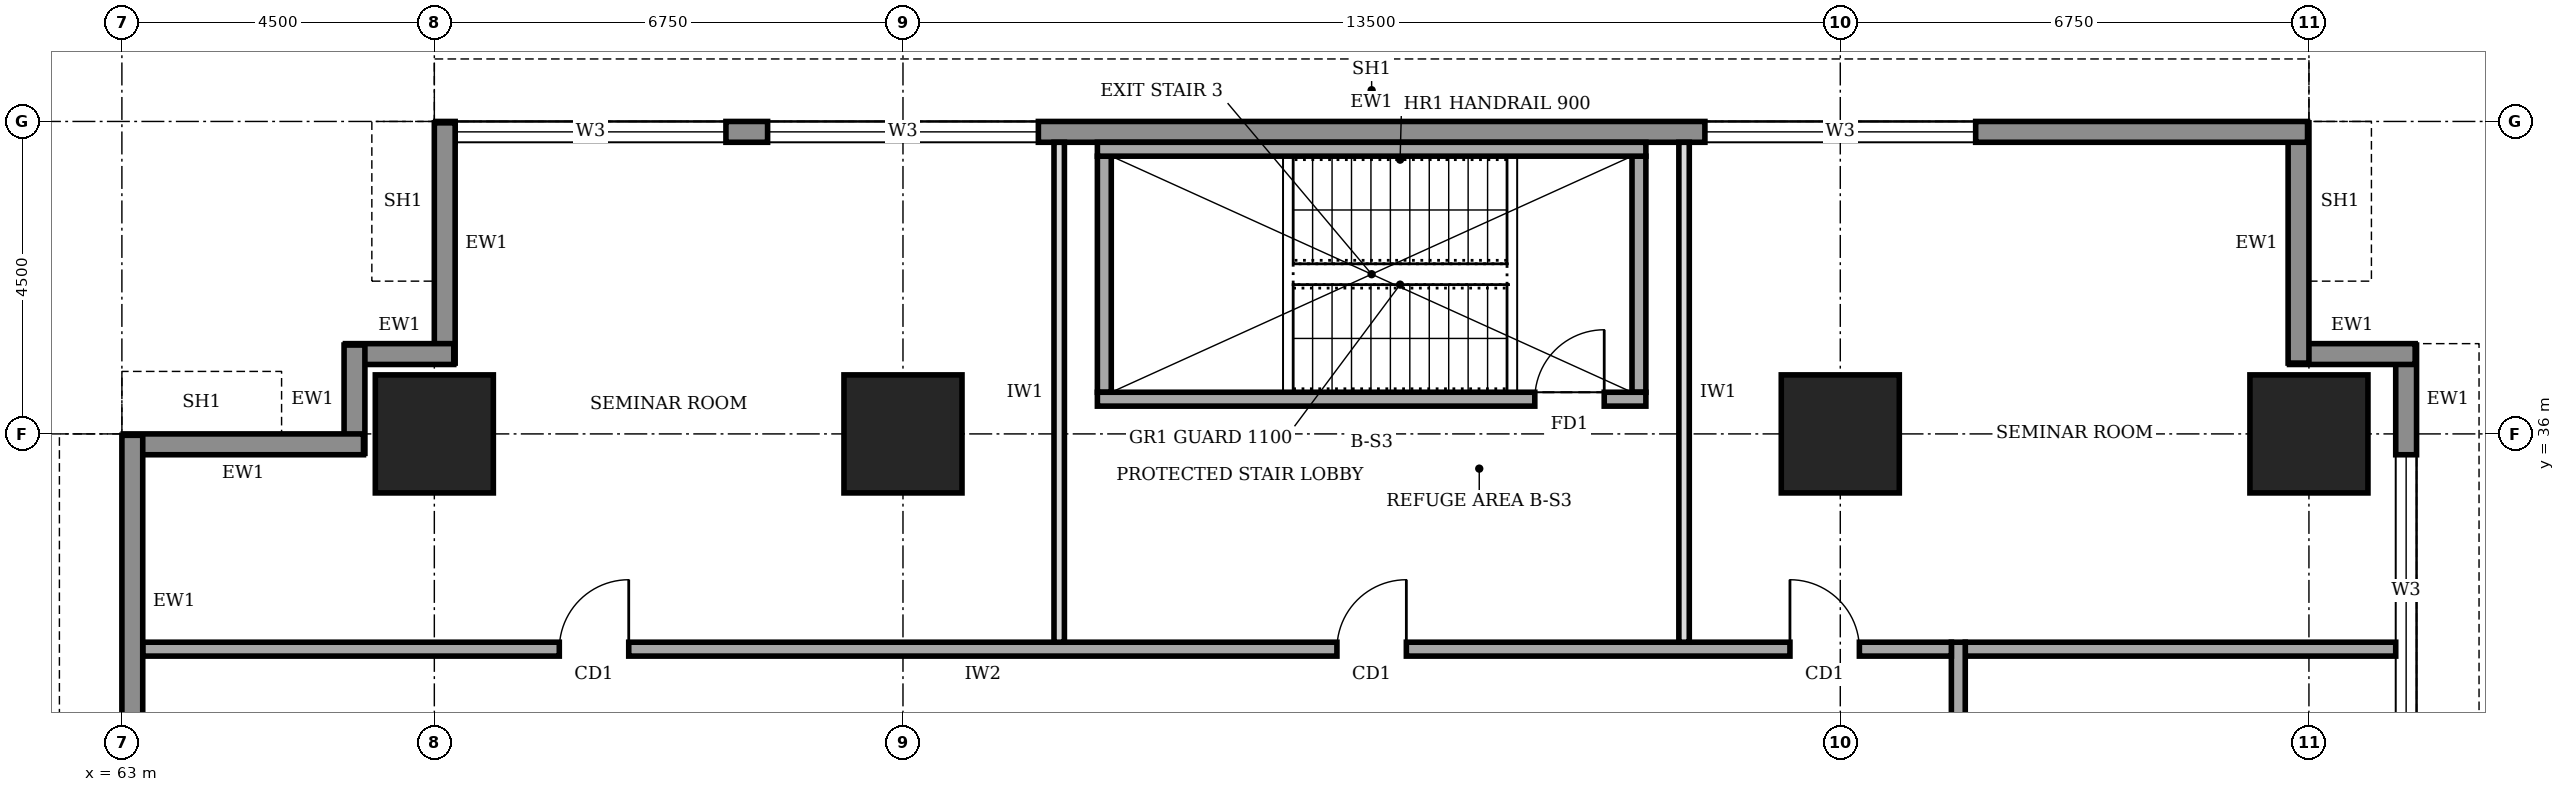
"""IFC4 building model, lengths in metres.
Left out: names, types, materials, properties, quantities, classifications, styles, units other than length and angle.
Written with IfcOpenShell. Run it as: python <this file> out.ifc"""

import sys

from ifc_helpers import new_model, si_unit, direction, frame, frame_2d, origin, origin_2d, place, context, subcontext, project, spatial, rectangle, extrude, element, fill, save


model = new_model("IFC4")
c1 = context("Model", 3, precision=1e-05, world=origin(), true_north=direction((0.0, 1.0)))
c2 = subcontext(c1, "Body", "Model", "MODEL_VIEW")
j1 = project(units=[si_unit("LENGTHUNIT", "METRE"), si_unit("PLANEANGLEUNIT", "RADIAN")], contexts=[c1])
p1 = place(None, origin())
s1 = spatial("IfcSite", under=j1, at=p1, CompositionType="ELEMENT")
p2 = place(p1, origin())
s2 = spatial("IfcBuilding", under=s1, at=p2, CompositionType="ELEMENT")
p3 = place(p2, frame((0.0, 0.0, 93.0)))
s3 = spatial("IfcBuildingStorey", under=s2, at=p3, CompositionType="ELEMENT", Elevation=93.0)
for number, where, z_axis, x_axis in (
    (1, (67.5, 36.0, 0.0), (0.0, 0.0, 1.0), (1.0, 0.0, 0.0)),
    (2, (74.25, 36.0, 0.0), (0.0, 0.0, 1.0), (1.0, 0.0, 0.0)),
    (3, (87.75, 36.0, 0.0), (0.0, 0.0, 1.0), (1.0, 0.0, 0.0)),
    (4, (94.5, 36.0, 0.0), (0.0, 0.0, 1.0), (1.0, 0.0, 0.0)),
):
    element("IfcColumn", number, at=place(p3, frame(where, z_axis=z_axis, x_axis=x_axis)), inside=s3, PredefinedType="COLUMN", context=c2, shape_type="SweptSolid", body=[
        extrude(rectangle(XDim=1.7, YDim=1.7, at=origin_2d()), origin(), (0.0, 0.0, 1.0), 4.0),
    ])
p4 = place(p3, frame((95.9, 3.32, 0.0), z_axis=(0.0, 0.0, 1.0), x_axis=(0.0, 1.0, 0.0)))
e5 = element("IfcWall", 5, at=p4, inside=s3, PredefinedType="STANDARD", context=c2, shape_type="SweptSolid", body=[
    extrude(rectangle(XDim=33.96, YDim=0.3, at=frame_2d((16.98, 0.0))), origin(), (0.0, 0.0, 1.0), 3.75),
])
p5 = place(p4, frame((1.48, 0.0, 0.95)))
e6 = element("IfcOpeningElement", 6, at=p5, cuts=e5, PredefinedType="OPENING", context=c2, shape_type="SweptSolid", body=[
    extrude(rectangle(XDim=3.9, YDim=1.8, at=frame_2d((1.95, 0.9))), frame((0.0, 0.16, 0.0), z_axis=(0.0, -1.0, 0.0), x_axis=(1.0, 0.0, 0.0)), (0.0, 0.0, 1.0), 0.32),
])
p6 = place(p4, frame((5.98, 0.0, 0.95)))
e7 = element("IfcOpeningElement", 7, at=p6, cuts=e5, PredefinedType="OPENING", context=c2, shape_type="SweptSolid", body=[
    extrude(rectangle(XDim=3.9, YDim=1.8, at=frame_2d((1.95, 0.9))), frame((0.0, 0.16, 0.0), z_axis=(0.0, -1.0, 0.0), x_axis=(1.0, 0.0, 0.0)), (0.0, 0.0, 1.0), 0.32),
])
p7 = place(p4, frame((10.48, 0.0, 0.95)))
e8 = element("IfcOpeningElement", 8, at=p7, cuts=e5, PredefinedType="OPENING", context=c2, shape_type="SweptSolid", body=[
    extrude(rectangle(XDim=3.9, YDim=1.8, at=frame_2d((1.95, 0.9))), frame((0.0, 0.16, 0.0), z_axis=(0.0, -1.0, 0.0), x_axis=(1.0, 0.0, 0.0)), (0.0, 0.0, 1.0), 0.32),
])
p8 = place(p4, frame((14.98, 0.0, 0.95)))
e9 = element("IfcOpeningElement", 9, at=p8, cuts=e5, PredefinedType="OPENING", context=c2, shape_type="SweptSolid", body=[
    extrude(rectangle(XDim=3.9, YDim=1.8, at=frame_2d((1.95, 0.9))), frame((0.0, 0.16, 0.0), z_axis=(0.0, -1.0, 0.0), x_axis=(1.0, 0.0, 0.0)), (0.0, 0.0, 1.0), 0.32),
])
p9 = place(p4, frame((19.48, 0.0, 0.95)))
e10 = element("IfcOpeningElement", 10, at=p9, cuts=e5, PredefinedType="OPENING", context=c2, shape_type="SweptSolid", body=[
    extrude(rectangle(XDim=3.9, YDim=1.8, at=frame_2d((1.95, 0.9))), frame((0.0, 0.16, 0.0), z_axis=(0.0, -1.0, 0.0), x_axis=(1.0, 0.0, 0.0)), (0.0, 0.0, 1.0), 0.32),
])
p10 = place(p4, frame((23.98, 0.0, 0.95)))
e11 = element("IfcOpeningElement", 11, at=p10, cuts=e5, PredefinedType="OPENING", context=c2, shape_type="SweptSolid", body=[
    extrude(rectangle(XDim=3.9, YDim=1.8, at=frame_2d((1.95, 0.9))), frame((0.0, 0.16, 0.0), z_axis=(0.0, -1.0, 0.0), x_axis=(1.0, 0.0, 0.0)), (0.0, 0.0, 1.0), 0.32),
])
p11 = place(p4, frame((28.48, 0.0, 0.95)))
e12 = element("IfcOpeningElement", 12, at=p11, cuts=e5, PredefinedType="OPENING", context=c2, shape_type="SweptSolid", body=[
    extrude(rectangle(XDim=3.9, YDim=1.8, at=frame_2d((1.95, 0.9))), frame((0.0, 0.16, 0.0), z_axis=(0.0, -1.0, 0.0), x_axis=(1.0, 0.0, 0.0)), (0.0, 0.0, 1.0), 0.32),
])
p12 = place(p3, frame((96.03, 37.15, 0.0), z_axis=(0.0, 0.0, 1.0), x_axis=(-1.0, 0.0, 0.0)))
e13 = element("IfcWall", 13, at=p12, inside=s3, PredefinedType="STANDARD", context=c2, shape_type="SweptSolid", body=[
    extrude(rectangle(XDim=1.81, YDim=0.3, at=frame_2d((0.905, 0.0))), origin(), (0.0, 0.0, 1.0), 3.75),
])
p13 = place(p3, frame((94.35, 37.02, 0.0), z_axis=(0.0, 0.0, 1.0), x_axis=(0.0, 1.0, 0.0)))
e14 = element("IfcWall", 14, at=p13, inside=s3, PredefinedType="STANDARD", context=c2, shape_type="SweptSolid", body=[
    extrude(rectangle(XDim=3.46, YDim=0.3, at=frame_2d((1.73, 0.0))), origin(), (0.0, 0.0, 1.0), 2.85),
])
p14 = place(p3, frame((94.48, 40.35, 0.0), z_axis=(0.0, 0.0, 1.0), x_axis=(-1.0, 0.0, 0.0)))
e15 = element("IfcWall", 15, at=p14, inside=s3, PredefinedType="STANDARD", context=c2, shape_type="SweptSolid", body=[
    extrude(rectangle(XDim=26.96, YDim=0.3, at=frame_2d((13.48, 0.0))), origin(), (0.0, 0.0, 1.0), 3.75),
])
p15 = place(p14, frame((22.78, 0.0, 0.95)))
e16 = element("IfcOpeningElement", 16, at=p15, cuts=e15, PredefinedType="OPENING", context=c2, shape_type="SweptSolid", body=[
    extrude(rectangle(XDim=3.9, YDim=1.8, at=frame_2d((1.95, 0.9))), frame((0.0, 0.16, 0.0), z_axis=(0.0, -1.0, 0.0), x_axis=(1.0, 0.0, 0.0)), (0.0, 0.0, 1.0), 0.32),
])
p16 = place(p14, frame((18.28, 0.0, 0.95)))
e17 = element("IfcOpeningElement", 17, at=p16, cuts=e15, PredefinedType="OPENING", context=c2, shape_type="SweptSolid", body=[
    extrude(rectangle(XDim=3.9, YDim=1.8, at=frame_2d((1.95, 0.9))), frame((0.0, 0.16, 0.0), z_axis=(0.0, -1.0, 0.0), x_axis=(1.0, 0.0, 0.0)), (0.0, 0.0, 1.0), 0.32),
])
p17 = place(p14, frame((4.78, 0.0, 0.95)))
e18 = element("IfcOpeningElement", 18, at=p17, cuts=e15, PredefinedType="OPENING", context=c2, shape_type="SweptSolid", body=[
    extrude(rectangle(XDim=3.9, YDim=1.8, at=frame_2d((1.95, 0.9))), frame((0.0, 0.16, 0.0), z_axis=(0.0, -1.0, 0.0), x_axis=(1.0, 0.0, 0.0)), (0.0, 0.0, 1.0), 0.32),
])
p18 = place(p3, frame((67.65, 40.48, 0.0), z_axis=(0.0, 0.0, 1.0), x_axis=(0.0, -1.0, 0.0)))
e19 = element("IfcWall", 19, at=p18, inside=s3, PredefinedType="STANDARD", context=c2, shape_type="SweptSolid", body=[
    extrude(rectangle(XDim=3.46, YDim=0.3, at=frame_2d((1.73, 0.0))), origin(), (0.0, 0.0, 1.0), 2.85),
])
for number, where, z_axis, x_axis in (
    (20, (67.78, 37.15, 0.0), (0.0, 0.0, 1.0), (-1.0, 0.0, 0.0)),
    (21, (66.35, 37.28, 0.0), (0.0, 0.0, 1.0), (0.0, -1.0, 0.0)),
):
    element("IfcWall", number, at=place(p3, frame(where, z_axis=z_axis, x_axis=x_axis)), inside=s3, PredefinedType="STANDARD", context=c2, shape_type="SweptSolid", body=[
        extrude(rectangle(XDim=1.56, YDim=0.3, at=frame_2d((0.78, 0.0))), origin(), (0.0, 0.0, 1.0), 3.75),
    ])
p19 = place(p3, frame((66.48, 35.85, 0.0), z_axis=(0.0, 0.0, 1.0), x_axis=(-1.0, 0.0, 0.0)))
e22 = element("IfcWall", 22, at=p19, inside=s3, PredefinedType="STANDARD", context=c2, shape_type="SweptSolid", body=[
    extrude(rectangle(XDim=3.46, YDim=0.3, at=frame_2d((1.73, 0.0))), origin(), (0.0, 0.0, 1.0), 2.85),
])
p20 = place(p3, frame((63.15, 35.98, 0.0), z_axis=(0.0, 0.0, 1.0), x_axis=(0.0, -1.0, 0.0)))
e23 = element("IfcWall", 23, at=p20, inside=s3, PredefinedType="STANDARD", context=c2, shape_type="SweptSolid", body=[
    extrude(rectangle(XDim=31.46, YDim=0.3, at=frame_2d((15.73, 0.0))), origin(), (0.0, 0.0, 1.0), 3.75),
])
p21 = place(p20, frame((27.28, 0.0, 0.95)))
e24 = element("IfcOpeningElement", 24, at=p21, cuts=e23, PredefinedType="OPENING", context=c2, shape_type="SweptSolid", body=[
    extrude(rectangle(XDim=3.9, YDim=1.8, at=frame_2d((1.95, 0.9))), frame((0.0, 0.16, 0.0), z_axis=(0.0, -1.0, 0.0), x_axis=(1.0, 0.0, 0.0)), (0.0, 0.0, 1.0), 0.32),
])
p22 = place(p20, frame((22.78, 0.0, 0.95)))
e25 = element("IfcOpeningElement", 25, at=p22, cuts=e23, PredefinedType="OPENING", context=c2, shape_type="SweptSolid", body=[
    extrude(rectangle(XDim=3.9, YDim=1.8, at=frame_2d((1.95, 0.9))), frame((0.0, 0.16, 0.0), z_axis=(0.0, -1.0, 0.0), x_axis=(1.0, 0.0, 0.0)), (0.0, 0.0, 1.0), 0.32),
])
p23 = place(p20, frame((18.28, 0.0, 0.95)))
e26 = element("IfcOpeningElement", 26, at=p23, cuts=e23, PredefinedType="OPENING", context=c2, shape_type="SweptSolid", body=[
    extrude(rectangle(XDim=3.9, YDim=1.8, at=frame_2d((1.95, 0.9))), frame((0.0, 0.16, 0.0), z_axis=(0.0, -1.0, 0.0), x_axis=(1.0, 0.0, 0.0)), (0.0, 0.0, 1.0), 0.32),
])
p24 = place(p20, frame((13.78, 0.0, 0.95)))
e27 = element("IfcOpeningElement", 27, at=p24, cuts=e23, PredefinedType="OPENING", context=c2, shape_type="SweptSolid", body=[
    extrude(rectangle(XDim=3.9, YDim=1.8, at=frame_2d((1.95, 0.9))), frame((0.0, 0.16, 0.0), z_axis=(0.0, -1.0, 0.0), x_axis=(1.0, 0.0, 0.0)), (0.0, 0.0, 1.0), 0.32),
])
p25 = place(p20, frame((9.28, 0.0, 0.95)))
e28 = element("IfcOpeningElement", 28, at=p25, cuts=e23, PredefinedType="OPENING", context=c2, shape_type="SweptSolid", body=[
    extrude(rectangle(XDim=3.9, YDim=1.8, at=frame_2d((1.95, 0.9))), frame((0.0, 0.16, 0.0), z_axis=(0.0, -1.0, 0.0), x_axis=(1.0, 0.0, 0.0)), (0.0, 0.0, 1.0), 0.32),
])
p26 = place(p20, frame((4.78, 0.0, 0.95)))
e29 = element("IfcOpeningElement", 29, at=p26, cuts=e23, PredefinedType="OPENING", context=c2, shape_type="SweptSolid", body=[
    extrude(rectangle(XDim=3.9, YDim=1.8, at=frame_2d((1.95, 0.9))), frame((0.0, 0.16, 0.0), z_axis=(0.0, -1.0, 0.0), x_axis=(1.0, 0.0, 0.0)), (0.0, 0.0, 1.0), 0.32),
])
p27 = place(p3, frame((89.45, 7.7, 0.0), z_axis=(0.0, 0.0, 1.0), x_axis=(0.0, 1.0, 0.0)))
e30 = element("IfcWall", 30, at=p27, inside=s3, PredefinedType="SOLIDWALL", context=c2, shape_type="SweptSolid", body=[
    extrude(rectangle(XDim=25.3, YDim=0.2, at=frame_2d((12.65, 0.0))), origin(), (0.0, 0.0, 1.0), 3.75),
])
p28 = place(p27, frame((2.3, 0.0, 0.0)))
e31 = element("IfcOpeningElement", 31, at=p28, cuts=e30, PredefinedType="OPENING", context=c2, shape_type="SweptSolid", body=[
    extrude(rectangle(XDim=1.0, YDim=2.1, at=frame_2d((0.5, 1.05))), frame((0.0, 0.11, 0.0), z_axis=(0.0, -1.0, 0.0), x_axis=(1.0, 0.0, 0.0)), (0.0, 0.0, 1.0), 0.22),
])
p29 = place(p27, frame((7.25, 0.0, 0.0)))
e32 = element("IfcOpeningElement", 32, at=p29, cuts=e30, PredefinedType="OPENING", context=c2, shape_type="SweptSolid", body=[
    extrude(rectangle(XDim=0.9, YDim=2.1, at=frame_2d((0.45, 1.05))), frame((0.0, 0.11, 0.0), z_axis=(0.0, -1.0, 0.0), x_axis=(1.0, 0.0, 0.0)), (0.0, 0.0, 1.0), 0.22),
])
p30 = place(p27, frame((10.25, 0.0, 0.0)))
e33 = element("IfcOpeningElement", 33, at=p30, cuts=e30, PredefinedType="OPENING", context=c2, shape_type="SweptSolid", body=[
    extrude(rectangle(XDim=0.9, YDim=2.1, at=frame_2d((0.45, 1.05))), frame((0.0, 0.11, 0.0), z_axis=(0.0, -1.0, 0.0), x_axis=(1.0, 0.0, 0.0)), (0.0, 0.0, 1.0), 0.22),
])
p31 = place(p27, frame((15.1, 0.0, 0.0)))
e34 = element("IfcOpeningElement", 34, at=p31, cuts=e30, PredefinedType="OPENING", context=c2, shape_type="SweptSolid", body=[
    extrude(rectangle(XDim=0.9, YDim=2.1, at=frame_2d((0.45, 1.05))), frame((0.0, 0.11, 0.0), z_axis=(0.0, -1.0, 0.0), x_axis=(1.0, 0.0, 0.0)), (0.0, 0.0, 1.0), 0.22),
])
p32 = place(p27, frame((17.8, 0.0, 0.0)))
e35 = element("IfcOpeningElement", 35, at=p32, cuts=e30, PredefinedType="OPENING", context=c2, shape_type="SweptSolid", body=[
    extrude(rectangle(XDim=1.0, YDim=2.1, at=frame_2d((0.5, 1.05))), frame((0.0, 0.11, 0.0), z_axis=(0.0, -1.0, 0.0), x_axis=(1.0, 0.0, 0.0)), (0.0, 0.0, 1.0), 0.22),
])
p33 = place(p27, frame((12.3, 0.0, 0.0)))
e36 = element("IfcOpeningElement", 36, at=p33, cuts=e30, PredefinedType="OPENING", context=c2, shape_type="SweptSolid", body=[
    extrude(rectangle(XDim=1.0, YDim=2.1, at=frame_2d((0.5, 1.05))), frame((0.0, 0.11, 0.0), z_axis=(0.0, -1.0, 0.0), x_axis=(1.0, 0.0, 0.0)), (0.0, 0.0, 1.0), 0.22),
])
p34 = place(p27, frame((21.8, 0.0, 0.0)))
e37 = element("IfcOpeningElement", 37, at=p34, cuts=e30, PredefinedType="OPENING", context=c2, shape_type="SweptSolid", body=[
    extrude(rectangle(XDim=1.0, YDim=2.1, at=frame_2d((0.5, 1.05))), frame((0.0, 0.11, 0.0), z_axis=(0.0, -1.0, 0.0), x_axis=(1.0, 0.0, 0.0)), (0.0, 0.0, 1.0), 0.22),
])
p35 = place(p3, frame((89.35, 32.9, 0.0), z_axis=(0.0, 0.0, 1.0), x_axis=(-1.0, 0.0, 0.0)))
e38 = element("IfcWall", 38, at=p35, inside=s3, PredefinedType="SOLIDWALL", context=c2, shape_type="SweptSolid", body=[
    extrude(rectangle(XDim=26.05, YDim=0.2, at=frame_2d((13.025, 0.0))), origin(), (0.0, 0.0, 1.0), 3.75),
])
p36 = place(p35, frame((19.05, 0.0, 0.0)))
e39 = element("IfcOpeningElement", 39, at=p36, cuts=e38, PredefinedType="OPENING", context=c2, shape_type="SweptSolid", body=[
    extrude(rectangle(XDim=1.0, YDim=2.1, at=frame_2d((0.5, 1.05))), frame((0.0, 0.11, 0.0), z_axis=(0.0, -1.0, 0.0), x_axis=(1.0, 0.0, 0.0)), (0.0, 0.0, 1.0), 0.22),
])
p37 = place(p35, frame((7.85, 0.0, 0.0)))
e40 = element("IfcOpeningElement", 40, at=p37, cuts=e38, PredefinedType="OPENING", context=c2, shape_type="SweptSolid", body=[
    extrude(rectangle(XDim=1.0, YDim=2.1, at=frame_2d((0.5, 1.05))), frame((0.0, 0.11, 0.0), z_axis=(0.0, -1.0, 0.0), x_axis=(1.0, 0.0, 0.0)), (0.0, 0.0, 1.0), 0.22),
])
p38 = place(p35, frame((1.325, 0.0, 0.0)))
e41 = element("IfcOpeningElement", 41, at=p38, cuts=e38, PredefinedType="OPENING", context=c2, shape_type="SweptSolid", body=[
    extrude(rectangle(XDim=1.0, YDim=2.1, at=frame_2d((0.5, 1.05))), frame((0.0, 0.11, 0.0), z_axis=(0.0, -1.0, 0.0), x_axis=(1.0, 0.0, 0.0)), (0.0, 0.0, 1.0), 0.22),
])
p39 = place(p3, frame((89.55, 32.9, 0.0), z_axis=(0.0, 0.0, 1.0), x_axis=(1.0, 0.0, 0.0)))
e42 = element("IfcWall", 42, at=p39, inside=s3, PredefinedType="SOLIDWALL", context=c2, shape_type="SweptSolid", body=[
    extrude(rectangle(XDim=6.2, YDim=0.2, at=frame_2d((3.1, 0.0))), origin(), (0.0, 0.0, 1.0), 3.75),
])
for number, where, z_axis, x_axis in (
    (43, (76.5, 33.0, 0.0), (0.0, 0.0, 1.0), (0.0, 1.0, 0.0)),
    (44, (85.5, 33.0, 0.0), (0.0, 0.0, 1.0), (0.0, 1.0, 0.0)),
):
    element("IfcWall", number, at=place(p3, frame(where, z_axis=z_axis, x_axis=x_axis)), inside=s3, PredefinedType="PARTITIONING", context=c2, shape_type="SweptSolid", body=[
        extrude(rectangle(XDim=7.2, YDim=0.15, at=frame_2d((3.6, 0.0))), origin(), (0.0, 0.0, 1.0), 3.75),
    ])
p40 = place(p3, frame((77.05, 36.5, 0.0), z_axis=(0.0, 0.0, 1.0), x_axis=(1.0, 0.0, 0.0)))
e45 = element("IfcWall", 45, at=p40, inside=s3, PredefinedType="SOLIDWALL", context=c2, shape_type="SweptSolid", body=[
    extrude(rectangle(XDim=7.9, YDim=0.2, at=frame_2d((3.95, 0.0))), origin(), (0.0, 0.0, 1.0), 3.75),
])
p41 = place(p40, frame((6.3, 0.0, 0.0)))
e46 = element("IfcOpeningElement", 46, at=p41, cuts=e45, PredefinedType="OPENING", context=c2, shape_type="SweptSolid", body=[
    extrude(rectangle(XDim=1.0, YDim=2.1, at=frame_2d((0.5, 1.05))), frame((0.0, 0.11, 0.0), z_axis=(0.0, -1.0, 0.0), x_axis=(1.0, 0.0, 0.0)), (0.0, 0.0, 1.0), 0.22),
])
p42 = place(p3, frame((77.05, 40.1, 0.0), z_axis=(0.0, 0.0, 1.0), x_axis=(1.0, 0.0, 0.0)))
e47 = element("IfcWall", 47, at=p42, inside=s3, PredefinedType="SOLIDWALL", context=c2, shape_type="SweptSolid", body=[
    extrude(rectangle(XDim=7.9, YDim=0.2, at=frame_2d((3.95, 0.0))), origin(), (0.0, 0.0, 1.0), 3.75),
])
for number, where, z_axis, x_axis in (
    (48, (77.15, 36.6, 0.0), (0.0, 0.0, 1.0), (0.0, 1.0, 0.0)),
    (49, (84.85, 36.6, 0.0), (0.0, 0.0, 1.0), (0.0, 1.0, 0.0)),
):
    element("IfcWall", number, at=place(p3, frame(where, z_axis=z_axis, x_axis=x_axis)), inside=s3, PredefinedType="SOLIDWALL", context=c2, shape_type="SweptSolid", body=[
        extrude(rectangle(XDim=3.4, YDim=0.2, at=frame_2d((1.7, 0.0))), origin(), (0.0, 0.0, 1.0), 3.75),
    ])
p43 = place(p11, origin())
e50 = element("IfcWindow", 50, at=p43, inside=s3, PartitioningType="SINGLE_PANEL", PredefinedType="WINDOW", context=c2, shape_type="SweptSolid", body=[
    extrude(rectangle(XDim=3.9, YDim=1.8, at=frame_2d((1.95, 0.9))), frame((0.0, 0.03, 0.0), z_axis=(0.0, -1.0, 0.0), x_axis=(1.0, 0.0, 0.0)), (0.0, 0.0, 1.0), 0.06),
])
fill(e12, e50)
p44 = place(p15, origin())
e51 = element("IfcWindow", 51, at=p44, inside=s3, PartitioningType="SINGLE_PANEL", PredefinedType="WINDOW", context=c2, shape_type="SweptSolid", body=[
    extrude(rectangle(XDim=3.9, YDim=1.8, at=frame_2d((1.95, 0.9))), frame((0.0, 0.03, 0.0), z_axis=(0.0, -1.0, 0.0), x_axis=(1.0, 0.0, 0.0)), (0.0, 0.0, 1.0), 0.06),
])
fill(e16, e51)
p45 = place(p16, origin())
e52 = element("IfcWindow", 52, at=p45, inside=s3, PartitioningType="SINGLE_PANEL", PredefinedType="WINDOW", context=c2, shape_type="SweptSolid", body=[
    extrude(rectangle(XDim=3.9, YDim=1.8, at=frame_2d((1.95, 0.9))), frame((0.0, 0.03, 0.0), z_axis=(0.0, -1.0, 0.0), x_axis=(1.0, 0.0, 0.0)), (0.0, 0.0, 1.0), 0.06),
])
fill(e17, e52)
p46 = place(p17, origin())
e53 = element("IfcWindow", 53, at=p46, inside=s3, PartitioningType="SINGLE_PANEL", PredefinedType="WINDOW", context=c2, shape_type="SweptSolid", body=[
    extrude(rectangle(XDim=3.9, YDim=1.8, at=frame_2d((1.95, 0.9))), frame((0.0, 0.03, 0.0), z_axis=(0.0, -1.0, 0.0), x_axis=(1.0, 0.0, 0.0)), (0.0, 0.0, 1.0), 0.06),
])
fill(e18, e53)
p47 = place(p36, frame((1.0, 0.0, 0.0), z_axis=(0.0, 0.0, 1.0), x_axis=(-1.0, 0.0, 0.0)))
e54 = element("IfcDoor", 54, at=p47, inside=s3, OperationType="SINGLE_SWING_RIGHT", PredefinedType="DOOR", context=c2, shape_type="SweptSolid", body=[
    extrude(rectangle(XDim=1.0, YDim=2.1, at=frame_2d((0.5, 1.05))), frame((0.0, 0.025, 0.0), z_axis=(0.0, -1.0, 0.0), x_axis=(1.0, 0.0, 0.0)), (0.0, 0.0, 1.0), 0.05),
])
fill(e39, e54)
p48 = place(p37, frame((1.0, 0.0, 0.0), z_axis=(0.0, 0.0, 1.0), x_axis=(-1.0, 0.0, 0.0)))
e55 = element("IfcDoor", 55, at=p48, inside=s3, OperationType="SINGLE_SWING_RIGHT", PredefinedType="DOOR", context=c2, shape_type="SweptSolid", body=[
    extrude(rectangle(XDim=1.0, YDim=2.1, at=frame_2d((0.5, 1.05))), frame((0.0, 0.025, 0.0), z_axis=(0.0, -1.0, 0.0), x_axis=(1.0, 0.0, 0.0)), (0.0, 0.0, 1.0), 0.05),
])
fill(e40, e55)
p49 = place(p38, frame((1.0, 0.0, 0.0), z_axis=(0.0, 0.0, 1.0), x_axis=(-1.0, 0.0, 0.0)))
e56 = element("IfcDoor", 56, at=p49, inside=s3, OperationType="SINGLE_SWING_LEFT", PredefinedType="DOOR", context=c2, shape_type="SweptSolid", body=[
    extrude(rectangle(XDim=1.0, YDim=2.1, at=frame_2d((0.5, 1.05))), frame((0.0, 0.025, 0.0), z_axis=(0.0, -1.0, 0.0), x_axis=(1.0, 0.0, 0.0)), (0.0, 0.0, 1.0), 0.05),
])
fill(e41, e56)
p50 = place(p41, origin())
e57 = element("IfcDoor", 57, at=p50, inside=s3, OperationType="SINGLE_SWING_RIGHT", PredefinedType="DOOR", context=c2, shape_type="SweptSolid", body=[
    extrude(rectangle(XDim=1.0, YDim=2.1, at=frame_2d((0.5, 1.05))), frame((0.0, 0.025, 0.0), z_axis=(0.0, -1.0, 0.0), x_axis=(1.0, 0.0, 0.0)), (0.0, 0.0, 1.0), 0.05),
])
fill(e46, e57)
save(model, sys.argv[1])
